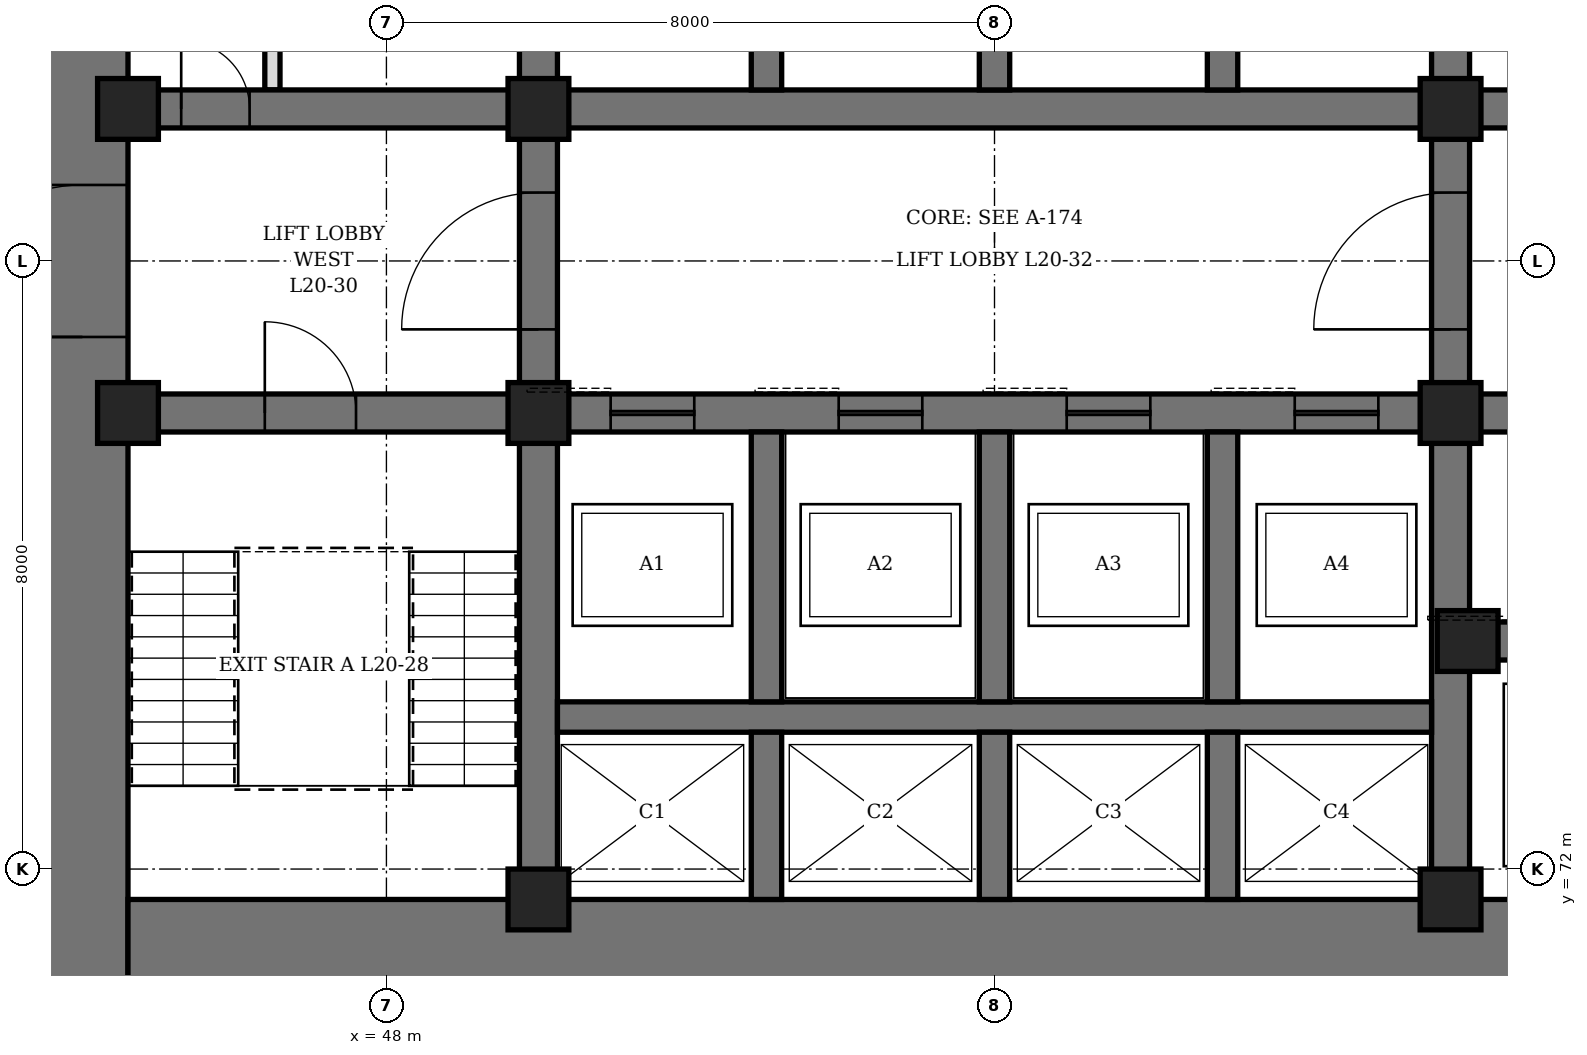
"""IFC4 building model, lengths in metres.
Left out: names, types, materials, properties, quantities, classifications, styles, units other than length and angle.
Written with IfcOpenShell. Run it as: python <this file> out.ifc"""

import sys

from ifc_helpers import new_model, si_unit, direction, frame, frame_2d, origin, origin_2d, place, context, subcontext, project, spatial, rectangle, hollow_rectangle, extrude, element, fill, save


model = new_model("IFC4")
c1 = context("Model", 3, precision=1e-05, world=origin(), true_north=direction((0.0, 1.0)))
c2 = subcontext(c1, "Body", "Model", "MODEL_VIEW")
j1 = project(units=[si_unit("LENGTHUNIT", "METRE"), si_unit("PLANEANGLEUNIT", "RADIAN")], contexts=[c1])
p1 = place(None, origin())
s1 = spatial("IfcSite", under=j1, at=p1, CompositionType="ELEMENT")
p2 = place(p1, origin())
s2 = spatial("IfcBuilding", under=s1, at=p2, CompositionType="ELEMENT")
p3 = place(p2, frame((0.0, 0.0, 93.7)))
s3 = spatial("IfcBuildingStorey", under=s2, at=p3, CompositionType="ELEMENT", Elevation=93.7)
p4 = place(p3, frame((44.0, 70.4, 0.0), z_axis=(0.0, 0.0, 1.0), x_axis=(0.0, 1.0, 0.0)))
e1 = element("IfcWall", 1, at=p4, inside=s3, PredefinedType="SHEAR", context=c2, shape_type="SweptSolid", body=[
    extrude(rectangle(XDim=19.2, YDim=1.2, at=frame_2d((9.6, 0.0))), origin(), (0.0, 0.0, 1.0), 4.2),
])
p5 = place(p4, frame((8.6, 0.0, 0.0)))
e2 = element("IfcOpeningElement", 2, at=p5, cuts=e1, PredefinedType="OPENING", context=c2, shape_type="SweptSolid", body=[
    extrude(rectangle(XDim=2.0, YDim=2.4, at=frame_2d((1.0, 1.2))), frame((0.0, 0.61, 0.0), z_axis=(0.0, -1.0, 0.0), x_axis=(1.0, 0.0, 0.0)), (0.0, 0.0, 1.0), 1.22),
])
p6 = place(p3, frame((44.6, 71.0, 0.0), z_axis=(0.0, 0.0, 1.0), x_axis=(1.0, 0.0, 0.0)))
e3 = element("IfcWall", 3, at=p6, inside=s3, PredefinedType="SHEAR", context=c2, shape_type="SweptSolid", body=[
    extrude(rectangle(XDim=22.8, YDim=1.2, at=frame_2d((11.4, 0.0))), origin(), (0.0, 0.0, 1.0), 4.2),
])
p7 = place(p3, frame((50.0, 71.6, 0.0), z_axis=(0.0, 0.0, 1.0), x_axis=(0.0, 1.0, 0.0)))
e4 = element("IfcWall", 4, at=p7, inside=s3, PredefinedType="SHEAR", context=c2, shape_type="SweptSolid", body=[
    extrude(rectangle(XDim=16.8, YDim=0.5, at=frame_2d((8.4, 0.0))), origin(), (0.0, 0.0, 1.0), 4.2),
])
p8 = place(p7, frame((7.5, 0.0, 0.0)))
e5 = element("IfcOpeningElement", 5, at=p8, cuts=e4, PredefinedType="OPENING", context=c2, shape_type="SweptSolid", body=[
    extrude(rectangle(XDim=1.8, YDim=2.4, at=frame_2d((0.9, 1.2))), frame((0.0, 0.26, 0.0), z_axis=(0.0, -1.0, 0.0), x_axis=(1.0, 0.0, 0.0)), (0.0, 0.0, 1.0), 0.52),
])
p9 = place(p3, frame((62.0, 71.6, 0.0), z_axis=(0.0, 0.0, 1.0), x_axis=(0.0, 1.0, 0.0)))
e6 = element("IfcWall", 6, at=p9, inside=s3, PredefinedType="SHEAR", context=c2, shape_type="SweptSolid", body=[
    extrude(rectangle(XDim=16.8, YDim=0.5, at=frame_2d((8.4, 0.0))), origin(), (0.0, 0.0, 1.0), 4.2),
])
p10 = place(p9, frame((7.5, 0.0, 0.0)))
e7 = element("IfcOpeningElement", 7, at=p10, cuts=e6, PredefinedType="OPENING", context=c2, shape_type="SweptSolid", body=[
    extrude(rectangle(XDim=1.8, YDim=2.4, at=frame_2d((0.9, 1.2))), frame((0.0, 0.26, 0.0), z_axis=(0.0, -1.0, 0.0), x_axis=(1.0, 0.0, 0.0)), (0.0, 0.0, 1.0), 0.52),
])
p11 = place(p3, frame((44.6, 78.0, 0.0), z_axis=(0.0, 0.0, 1.0), x_axis=(1.0, 0.0, 0.0)))
e8 = element("IfcWall", 8, at=p11, inside=s3, PredefinedType="SHEAR", context=c2, shape_type="SweptSolid", body=[
    extrude(rectangle(XDim=5.15, YDim=0.5, at=frame_2d((2.575, 0.0))), origin(), (0.0, 0.0, 1.0), 4.2),
])
p12 = place(p11, frame((1.8, 0.0, 0.0)))
e9 = element("IfcOpeningElement", 9, at=p12, cuts=e8, PredefinedType="OPENING", context=c2, shape_type="SweptSolid", body=[
    extrude(rectangle(XDim=1.2, YDim=2.1, at=frame_2d((0.6, 1.05))), frame((0.0, 0.26, 0.0), z_axis=(0.0, -1.0, 0.0), x_axis=(1.0, 0.0, 0.0)), (0.0, 0.0, 1.0), 0.52),
])
p13 = place(p3, frame((44.6, 82.0, 0.0), z_axis=(0.0, 0.0, 1.0), x_axis=(1.0, 0.0, 0.0)))
e10 = element("IfcWall", 10, at=p13, inside=s3, PredefinedType="SHEAR", context=c2, shape_type="SweptSolid", body=[
    extrude(rectangle(XDim=5.15, YDim=0.5, at=frame_2d((2.575, 0.0))), origin(), (0.0, 0.0, 1.0), 4.2),
])
p14 = place(p13, frame((0.7, 0.0, 0.0)))
e11 = element("IfcOpeningElement", 11, at=p14, cuts=e10, PredefinedType="OPENING", context=c2, shape_type="SweptSolid", body=[
    extrude(rectangle(XDim=0.9, YDim=2.1, at=frame_2d((0.45, 1.05))), frame((0.0, 0.26, 0.0), z_axis=(0.0, -1.0, 0.0), x_axis=(1.0, 0.0, 0.0)), (0.0, 0.0, 1.0), 0.52),
])
p15 = place(p3, frame((62.25, 75.0, 0.0), z_axis=(0.0, 0.0, 1.0), x_axis=(1.0, 0.0, 0.0)))
e12 = element("IfcWall", 12, at=p15, inside=s3, PredefinedType="SHEAR", context=c2, shape_type="SweptSolid", body=[
    extrude(rectangle(XDim=5.15, YDim=0.5, at=frame_2d((2.575, 0.0))), origin(), (0.0, 0.0, 1.0), 4.2),
])
p16 = place(p15, frame((0.65, 0.0, 0.0)))
e13 = element("IfcOpeningElement", 13, at=p16, cuts=e12, PredefinedType="OPENING", context=c2, shape_type="SweptSolid", body=[
    extrude(rectangle(XDim=1.2, YDim=2.2, at=frame_2d((0.6, 1.1))), frame((0.0, 0.26, 0.0), z_axis=(0.0, -1.0, 0.0), x_axis=(1.0, 0.0, 0.0)), (0.0, 0.0, 1.0), 0.52),
])
p17 = place(p15, frame((3.4, 0.0, 0.0)))
e14 = element("IfcOpeningElement", 14, at=p17, cuts=e12, PredefinedType="OPENING", context=c2, shape_type="SweptSolid", body=[
    extrude(rectangle(XDim=1.2, YDim=2.2, at=frame_2d((0.6, 1.1))), frame((0.0, 0.26, 0.0), z_axis=(0.0, -1.0, 0.0), x_axis=(1.0, 0.0, 0.0)), (0.0, 0.0, 1.0), 0.52),
])
p18 = place(p3, frame((62.25, 78.0, 0.0), z_axis=(0.0, 0.0, 1.0), x_axis=(1.0, 0.0, 0.0)))
e15 = element("IfcWall", 15, at=p18, inside=s3, PredefinedType="SHEAR", context=c2, shape_type="SweptSolid", body=[
    extrude(rectangle(XDim=5.15, YDim=0.5, at=frame_2d((2.575, 0.0))), origin(), (0.0, 0.0, 1.0), 4.2),
])
p19 = place(p18, frame((2.15, 0.0, 0.0)))
e16 = element("IfcOpeningElement", 16, at=p19, cuts=e15, PredefinedType="OPENING", context=c2, shape_type="SweptSolid", body=[
    extrude(rectangle(XDim=1.2, YDim=2.1, at=frame_2d((0.6, 1.05))), frame((0.0, 0.26, 0.0), z_axis=(0.0, -1.0, 0.0), x_axis=(1.0, 0.0, 0.0)), (0.0, 0.0, 1.0), 0.52),
])
p20 = place(p3, frame((62.25, 82.0, 0.0), z_axis=(0.0, 0.0, 1.0), x_axis=(1.0, 0.0, 0.0)))
e17 = element("IfcWall", 17, at=p20, inside=s3, PredefinedType="SHEAR", context=c2, shape_type="SweptSolid", body=[
    extrude(rectangle(XDim=5.15, YDim=0.5, at=frame_2d((2.575, 0.0))), origin(), (0.0, 0.0, 1.0), 4.2),
])
p21 = place(p20, frame((2.15, 0.0, 0.0)))
e18 = element("IfcOpeningElement", 18, at=p21, cuts=e17, PredefinedType="OPENING", context=c2, shape_type="SweptSolid", body=[
    extrude(rectangle(XDim=1.2, YDim=2.1, at=frame_2d((0.6, 1.05))), frame((0.0, 0.26, 0.0), z_axis=(0.0, -1.0, 0.0), x_axis=(1.0, 0.0, 0.0)), (0.0, 0.0, 1.0), 0.52),
])
p22 = place(p3, frame((50.25, 78.0, 0.0), z_axis=(0.0, 0.0, 1.0), x_axis=(1.0, 0.0, 0.0)))
e19 = element("IfcWall", 19, at=p22, inside=s3, PredefinedType="SHEAR", context=c2, shape_type="SweptSolid", body=[
    extrude(rectangle(XDim=11.5, YDim=0.5, at=frame_2d((5.75, 0.0))), origin(), (0.0, 0.0, 1.0), 4.2),
])
p23 = place(p22, frame((0.7, 0.0, 0.0)))
e20 = element("IfcOpeningElement", 20, at=p23, cuts=e19, PredefinedType="OPENING", context=c2, shape_type="SweptSolid", body=[
    extrude(rectangle(XDim=1.1, YDim=2.2, at=frame_2d((0.55, 1.1))), frame((0.0, 0.26, 0.0), z_axis=(0.0, -1.0, 0.0), x_axis=(1.0, 0.0, 0.0)), (0.0, 0.0, 1.0), 0.52),
])
p24 = place(p22, frame((3.7, 0.0, 0.0)))
e21 = element("IfcOpeningElement", 21, at=p24, cuts=e19, PredefinedType="OPENING", context=c2, shape_type="SweptSolid", body=[
    extrude(rectangle(XDim=1.1, YDim=2.2, at=frame_2d((0.55, 1.1))), frame((0.0, 0.26, 0.0), z_axis=(0.0, -1.0, 0.0), x_axis=(1.0, 0.0, 0.0)), (0.0, 0.0, 1.0), 0.52),
])
p25 = place(p22, frame((6.7, 0.0, 0.0)))
e22 = element("IfcOpeningElement", 22, at=p25, cuts=e19, PredefinedType="OPENING", context=c2, shape_type="SweptSolid", body=[
    extrude(rectangle(XDim=1.1, YDim=2.2, at=frame_2d((0.55, 1.1))), frame((0.0, 0.26, 0.0), z_axis=(0.0, -1.0, 0.0), x_axis=(1.0, 0.0, 0.0)), (0.0, 0.0, 1.0), 0.52),
])
p26 = place(p22, frame((9.7, 0.0, 0.0)))
e23 = element("IfcOpeningElement", 23, at=p26, cuts=e19, PredefinedType="OPENING", context=c2, shape_type="SweptSolid", body=[
    extrude(rectangle(XDim=1.1, YDim=2.2, at=frame_2d((0.55, 1.1))), frame((0.0, 0.26, 0.0), z_axis=(0.0, -1.0, 0.0), x_axis=(1.0, 0.0, 0.0)), (0.0, 0.0, 1.0), 0.52),
])
p27 = place(p3, frame((50.25, 82.0, 0.0), z_axis=(0.0, 0.0, 1.0), x_axis=(1.0, 0.0, 0.0)))
e24 = element("IfcWall", 24, at=p27, inside=s3, PredefinedType="SHEAR", context=c2, shape_type="SweptSolid", body=[
    extrude(rectangle(XDim=11.5, YDim=0.5, at=frame_2d((5.75, 0.0))), origin(), (0.0, 0.0, 1.0), 4.2),
])
p28 = place(p3, frame((50.25, 74.0, 0.0), z_axis=(0.0, 0.0, 1.0), x_axis=(1.0, 0.0, 0.0)))
e25 = element("IfcWall", 25, at=p28, inside=s3, PredefinedType="SHEAR", context=c2, shape_type="SweptSolid", body=[
    extrude(rectangle(XDim=11.5, YDim=0.4, at=frame_2d((5.75, 0.0))), origin(), (0.0, 0.0, 1.0), 4.2),
])
p29 = place(p3, frame((53.0, 71.6, 0.0), z_axis=(0.0, 0.0, 1.0), x_axis=(0.0, 1.0, 0.0)))
e26 = element("IfcWall", 26, at=p29, inside=s3, PredefinedType="SHEAR", context=c2, shape_type="SweptSolid", body=[
    extrude(rectangle(XDim=2.2, YDim=0.4, at=frame_2d((1.1, 0.0))), origin(), (0.0, 0.0, 1.0), 4.2),
])
p30 = place(p3, frame((53.0, 74.2, 0.0), z_axis=(0.0, 0.0, 1.0), x_axis=(0.0, 1.0, 0.0)))
e27 = element("IfcWall", 27, at=p30, inside=s3, PredefinedType="SHEAR", context=c2, shape_type="SweptSolid", body=[
    extrude(rectangle(XDim=3.55, YDim=0.4, at=frame_2d((1.775, 0.0))), origin(), (0.0, 0.0, 1.0), 4.2),
])
p31 = place(p3, frame((53.0, 82.25, 0.0), z_axis=(0.0, 0.0, 1.0), x_axis=(0.0, 1.0, 0.0)))
e28 = element("IfcWall", 28, at=p31, inside=s3, PredefinedType="SHEAR", context=c2, shape_type="SweptSolid", body=[
    extrude(rectangle(XDim=3.5, YDim=0.4, at=frame_2d((1.75, 0.0))), origin(), (0.0, 0.0, 1.0), 4.2),
])
p32 = place(p3, frame((56.0, 71.6, 0.0), z_axis=(0.0, 0.0, 1.0), x_axis=(0.0, 1.0, 0.0)))
e29 = element("IfcWall", 29, at=p32, inside=s3, PredefinedType="SHEAR", context=c2, shape_type="SweptSolid", body=[
    extrude(rectangle(XDim=2.2, YDim=0.4, at=frame_2d((1.1, 0.0))), origin(), (0.0, 0.0, 1.0), 4.2),
])
p33 = place(p3, frame((56.0, 74.2, 0.0), z_axis=(0.0, 0.0, 1.0), x_axis=(0.0, 1.0, 0.0)))
e30 = element("IfcWall", 30, at=p33, inside=s3, PredefinedType="SHEAR", context=c2, shape_type="SweptSolid", body=[
    extrude(rectangle(XDim=3.55, YDim=0.4, at=frame_2d((1.775, 0.0))), origin(), (0.0, 0.0, 1.0), 4.2),
])
p34 = place(p3, frame((56.0, 82.25, 0.0), z_axis=(0.0, 0.0, 1.0), x_axis=(0.0, 1.0, 0.0)))
e31 = element("IfcWall", 31, at=p34, inside=s3, PredefinedType="SHEAR", context=c2, shape_type="SweptSolid", body=[
    extrude(rectangle(XDim=3.5, YDim=0.4, at=frame_2d((1.75, 0.0))), origin(), (0.0, 0.0, 1.0), 4.2),
])
p35 = place(p3, frame((59.0, 71.6, 0.0), z_axis=(0.0, 0.0, 1.0), x_axis=(0.0, 1.0, 0.0)))
e32 = element("IfcWall", 32, at=p35, inside=s3, PredefinedType="SHEAR", context=c2, shape_type="SweptSolid", body=[
    extrude(rectangle(XDim=2.2, YDim=0.4, at=frame_2d((1.1, 0.0))), origin(), (0.0, 0.0, 1.0), 4.2),
])
p36 = place(p3, frame((59.0, 74.2, 0.0), z_axis=(0.0, 0.0, 1.0), x_axis=(0.0, 1.0, 0.0)))
e33 = element("IfcWall", 33, at=p36, inside=s3, PredefinedType="SHEAR", context=c2, shape_type="SweptSolid", body=[
    extrude(rectangle(XDim=3.55, YDim=0.4, at=frame_2d((1.775, 0.0))), origin(), (0.0, 0.0, 1.0), 4.2),
])
p37 = place(p3, frame((59.0, 82.25, 0.0), z_axis=(0.0, 0.0, 1.0), x_axis=(0.0, 1.0, 0.0)))
e34 = element("IfcWall", 34, at=p37, inside=s3, PredefinedType="SHEAR", context=c2, shape_type="SweptSolid", body=[
    extrude(rectangle(XDim=3.5, YDim=0.4, at=frame_2d((1.75, 0.0))), origin(), (0.0, 0.0, 1.0), 4.2),
])
for number, where, z_axis, x_axis in (
    (35, (44.6, 78.0, 0.0), (0.0, 0.0, 1.0), (1.0, 0.0, 0.0)),
    (36, (44.6, 82.0, 0.0), (0.0, 0.0, 1.0), (1.0, 0.0, 0.0)),
    (37, (50.0, 71.6, 0.0), (0.0, 0.0, 1.0), (1.0, 0.0, 0.0)),
    (38, (50.0, 78.0, 0.0), (0.0, 0.0, 1.0), (1.0, 0.0, 0.0)),
    (39, (50.0, 82.0, 0.0), (0.0, 0.0, 1.0), (1.0, 0.0, 0.0)),
    (40, (62.0, 71.6, 0.0), (0.0, 0.0, 1.0), (1.0, 0.0, 0.0)),
    (41, (62.0, 78.0, 0.0), (0.0, 0.0, 1.0), (1.0, 0.0, 0.0)),
    (42, (62.0, 82.0, 0.0), (0.0, 0.0, 1.0), (1.0, 0.0, 0.0)),
    (43, (62.225, 75.0, 0.0), (0.0, 0.0, 1.0), (1.0, 0.0, 0.0)),
):
    element("IfcColumn", number, at=place(p3, frame(where, z_axis=z_axis, x_axis=x_axis)), inside=s3, PredefinedType="COLUMN", context=c2, shape_type="SweptSolid", body=[
        extrude(hollow_rectangle(XDim=0.8, YDim=0.8, WallThickness=0.1, at=origin_2d()), origin(), (0.0, 0.0, 1.0), 4.2),
    ])
p38 = place(p3, frame((46.5, 82.25, 0.0), z_axis=(0.0, 0.0, 1.0), x_axis=(0.0, 1.0, 0.0)))
e44 = element("IfcWall", 44, at=p38, inside=s3, PredefinedType="PARTITIONING", context=c2, shape_type="SweptSolid", body=[
    extrude(rectangle(XDim=3.0, YDim=0.2, at=frame_2d((1.5, 0.0))), origin(), (0.0, 0.0, 1.0), 4.04),
])
p39 = place(p38, frame((1.05, 0.0, 0.0)))
e45 = element("IfcOpeningElement", 45, at=p39, cuts=e44, PredefinedType="OPENING", context=c2, shape_type="SweptSolid", body=[
    extrude(rectangle(XDim=0.9, YDim=2.1, at=frame_2d((0.45, 1.05))), frame((0.0, 0.11, 0.0), z_axis=(0.0, -1.0, 0.0), x_axis=(1.0, 0.0, 0.0)), (0.0, 0.0, 1.0), 0.22),
])
p40 = place(p14, origin())
e46 = element("IfcDoor", 46, at=p40, inside=s3, OperationType="SINGLE_SWING_LEFT", PredefinedType="DOOR", context=c2, shape_type="SweptSolid", body=[
    extrude(rectangle(XDim=0.9, YDim=2.1, at=frame_2d((0.45, 1.05))), frame((0.0, 0.25, 0.0), z_axis=(0.0, -1.0, 0.0), x_axis=(1.0, 0.0, 0.0)), (0.0, 0.0, 1.0), 0.5),
])
fill(e11, e46)
p41 = place(p12, origin())
e47 = element("IfcDoor", 47, at=p41, inside=s3, OperationType="SINGLE_SWING_LEFT", PredefinedType="DOOR", context=c2, shape_type="SweptSolid", body=[
    extrude(rectangle(XDim=1.2, YDim=2.1, at=frame_2d((0.6, 1.05))), frame((0.0, 0.25, 0.0), z_axis=(0.0, -1.0, 0.0), x_axis=(1.0, 0.0, 0.0)), (0.0, 0.0, 1.0), 0.5),
])
fill(e9, e47)
p42 = place(p5, origin())
e48 = element("IfcDoor", 48, at=p42, inside=s3, OperationType="DOUBLE_DOOR_SINGLE_SWING", PredefinedType="DOOR", context=c2, shape_type="SweptSolid", body=[
    extrude(rectangle(XDim=2.0, YDim=2.4, at=frame_2d((1.0, 1.2))), frame((0.0, 0.35, 0.0), z_axis=(0.0, -1.0, 0.0), x_axis=(1.0, 0.0, 0.0)), (0.0, 0.0, 1.0), 0.7),
])
fill(e2, e48)
p43 = place(p8, origin())
e49 = element("IfcDoor", 49, at=p43, inside=s3, OperationType="DOUBLE_DOOR_SINGLE_SWING", PredefinedType="DOOR", context=c2, shape_type="SweptSolid", body=[
    extrude(rectangle(XDim=1.8, YDim=2.4, at=frame_2d((0.9, 1.2))), frame((0.0, 0.25, 0.0), z_axis=(0.0, -1.0, 0.0), x_axis=(1.0, 0.0, 0.0)), (0.0, 0.0, 1.0), 0.5),
])
fill(e5, e49)
p44 = place(p10, origin())
e50 = element("IfcDoor", 50, at=p44, inside=s3, OperationType="DOUBLE_DOOR_SINGLE_SWING", PredefinedType="DOOR", context=c2, shape_type="SweptSolid", body=[
    extrude(rectangle(XDim=1.8, YDim=2.4, at=frame_2d((0.9, 1.2))), frame((0.0, 0.25, 0.0), z_axis=(0.0, -1.0, 0.0), x_axis=(1.0, 0.0, 0.0)), (0.0, 0.0, 1.0), 0.5),
])
fill(e7, e50)
p45 = place(p23, origin())
e51 = element("IfcDoor", 51, at=p45, inside=s3, OperationType="SLIDING_TO_LEFT", PredefinedType="DOOR", context=c2, shape_type="SweptSolid", body=[
    extrude(rectangle(XDim=1.1, YDim=2.2, at=frame_2d((0.55, 1.1))), frame((0.0, 0.25, 0.0), z_axis=(0.0, -1.0, 0.0), x_axis=(1.0, 0.0, 0.0)), (0.0, 0.0, 1.0), 0.5),
])
fill(e20, e51)
p46 = place(p24, origin())
e52 = element("IfcDoor", 52, at=p46, inside=s3, OperationType="SLIDING_TO_LEFT", PredefinedType="DOOR", context=c2, shape_type="SweptSolid", body=[
    extrude(rectangle(XDim=1.1, YDim=2.2, at=frame_2d((0.55, 1.1))), frame((0.0, 0.25, 0.0), z_axis=(0.0, -1.0, 0.0), x_axis=(1.0, 0.0, 0.0)), (0.0, 0.0, 1.0), 0.5),
])
fill(e21, e52)
p47 = place(p25, origin())
e53 = element("IfcDoor", 53, at=p47, inside=s3, OperationType="SLIDING_TO_LEFT", PredefinedType="DOOR", context=c2, shape_type="SweptSolid", body=[
    extrude(rectangle(XDim=1.1, YDim=2.2, at=frame_2d((0.55, 1.1))), frame((0.0, 0.25, 0.0), z_axis=(0.0, -1.0, 0.0), x_axis=(1.0, 0.0, 0.0)), (0.0, 0.0, 1.0), 0.5),
])
fill(e22, e53)
p48 = place(p26, origin())
e54 = element("IfcDoor", 54, at=p48, inside=s3, OperationType="SLIDING_TO_LEFT", PredefinedType="DOOR", context=c2, shape_type="SweptSolid", body=[
    extrude(rectangle(XDim=1.1, YDim=2.2, at=frame_2d((0.55, 1.1))), frame((0.0, 0.25, 0.0), z_axis=(0.0, -1.0, 0.0), x_axis=(1.0, 0.0, 0.0)), (0.0, 0.0, 1.0), 0.5),
])
fill(e23, e54)
save(model, sys.argv[1])
